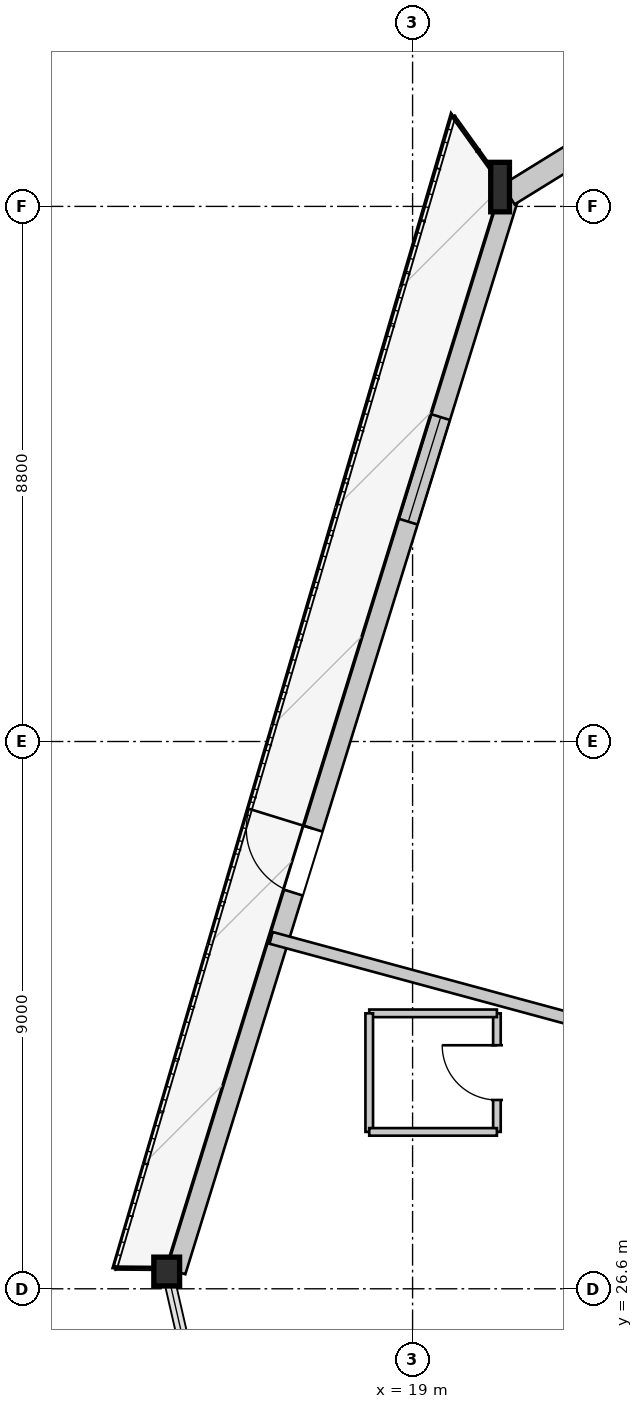
"""IFC4 building model, lengths in metres.
Left out: names, types, materials, properties, quantities, classifications, styles, units other than length and angle.
Written with IfcOpenShell. Run it as: python <this file> out.ifc"""

import sys

from ifc_helpers import new_model, si_unit, direction, frame, frame_2d, origin, origin_2d, place, context, subcontext, project, spatial, rectangle, i_section, extrude, source, transform, mapped, element, fill, save


model = new_model("IFC4")
c1 = context("Model", 3, precision=1e-05, world=origin(), true_north=direction((0.0, 1.0)))
c2 = subcontext(c1, "Body", "Model", "MODEL_VIEW")
j1 = project(units=[si_unit("LENGTHUNIT", "METRE"), si_unit("PLANEANGLEUNIT", "RADIAN")], contexts=[c1])
p1 = place(None, origin())
s1 = spatial("IfcSite", under=j1, at=p1, CompositionType="ELEMENT")
p2 = place(p1, origin())
s2 = spatial("IfcBuilding", under=s1, at=p2, CompositionType="ELEMENT")
p3 = place(p2, frame((0.0, 0.0, 32.85)))
s3 = spatial("IfcBuildingStorey", under=s2, at=p3, CompositionType="ELEMENT", Elevation=32.85)
m1 = source(origin(), c2, "Body", "SweptSolid", [
    extrude(i_section(OverallWidth=0.308, OverallDepth=0.814, WebThickness=0.021, FlangeThickness=0.04, at=origin_2d()), origin(), (0.0, 0.0, 1.0), 3.387),
])
p4 = place(p3, frame((20.479, 44.756, 0.0), z_axis=(-0.023283783401, -0.02263500925, 0.99947262183), x_axis=(0.69704669242, -0.717025737744, 0.0)))
e1 = element("IfcColumn", 1, at=p4, inside=s3, PredefinedType="COLUMN", context=c2, shape_type="MappedRepresentation", body=[
    mapped(m1, transform((0.0, 0.0, 0.0), x_axis=(1.0, 0.0, 0.0), y_axis=(0.0, 1.0, 0.0), z_axis=(0.0, 0.0, 1.0), scale=1.0)),
])
m2 = source(origin(), c2, "Body", "SweptSolid", [
    extrude(i_section(OverallWidth=0.424, OverallDepth=0.474, WebThickness=0.043, FlangeThickness=0.068, at=origin_2d()), origin(), (0.0, 0.0, 1.0), 3.386),
])
p5 = place(p3, frame((14.957, 26.934, 0.0), z_axis=(-0.000360461137, -0.029701997702, 0.999558733342), x_axis=(0.999926367828, -0.012135028736, 0.0)))
e2 = element("IfcColumn", 2, at=p5, inside=s3, PredefinedType="COLUMN", context=c2, shape_type="MappedRepresentation", body=[
    mapped(m2, transform((0.0, 0.0, 0.0), x_axis=(1.0, 0.0, 0.0), y_axis=(0.0, 1.0, 0.0), z_axis=(0.0, 0.0, 1.0), scale=1.0)),
])
p6 = place(p3, frame((15.11, 26.886, 0.0), z_axis=(0.0, 0.0, 1.0), x_axis=(0.295931636949, 0.955209121739, 0.0)))
e3 = element("IfcWall", 3, at=p6, inside=s3, PredefinedType="SOLIDWALL", context=c2, shape_type="SweptSolid", body=[
    extrude(rectangle(XDim=18.658, YDim=0.32, at=frame_2d((9.329, 0.0))), origin(), (0.0, 0.0, 1.0), 2.592),
])
p7 = place(p6, frame((6.521, 0.0, 0.0)))
e4 = element("IfcOpeningElement", 4, at=p7, cuts=e3, PredefinedType="OPENING", context=c2, shape_type="SweptSolid", body=[
    extrude(rectangle(XDim=1.1, YDim=2.3, at=frame_2d((0.55, 1.15))), frame((0.0, 0.17, 0.0), z_axis=(0.0, -1.0, 0.0), x_axis=(1.0, 0.0, 0.0)), (0.0, 0.0, 1.0), 0.34),
])
p8 = place(p6, frame((12.907, 0.0, 0.272)))
e5 = element("IfcOpeningElement", 5, at=p8, cuts=e3, PredefinedType="OPENING", context=c2, shape_type="SweptSolid", body=[
    extrude(rectangle(XDim=1.8, YDim=2.2, at=frame_2d((0.9, 1.1))), frame((0.0, 0.17, 0.0), z_axis=(0.0, -1.0, 0.0), x_axis=(1.0, 0.0, 0.0)), (0.0, 0.0, 1.0), 0.34),
])
p9 = place(p3, frame((20.578, 44.594, 0.0), z_axis=(0.0, 0.0, 1.0), x_axis=(0.850784925856, 0.525514043519, 0.0)))
e6 = element("IfcWall", 6, at=p9, inside=s3, PredefinedType="SOLIDWALL", context=c2, shape_type="SweptSolid", body=[
    extrude(rectangle(XDim=6.631, YDim=0.38, at=frame_2d((3.316, 0.0))), origin(), (0.0, 0.0, 1.0), 2.592),
])
p10 = place(p3, frame((27.3, 29.495, 0.0), z_axis=(0.0, 0.0, 1.0), x_axis=(-0.965288478022, 0.261186052841, 0.0)))
e7 = element("IfcWall", 7, at=p10, inside=s3, PredefinedType="PARTITIONING", context=c2, shape_type="SweptSolid", body=[
    extrude(rectangle(XDim=11.009, YDim=0.2, at=frame_2d((5.505, 0.0))), origin(), (0.0, 0.0, 1.0), 3.3),
])
p11 = place(p3, frame((20.387, 29.18, 0.0), z_axis=(0.0, 0.0, 1.0), x_axis=(0.0, 1.0, 0.0)))
e8 = element("IfcWall", 8, at=p11, inside=s3, PredefinedType="PARTITIONING", context=c2, shape_type="SweptSolid", body=[
    extrude(rectangle(XDim=1.95, YDim=0.125, at=frame_2d((0.975, 0.0))), origin(), (0.0, 0.0, 1.0), 3.3),
])
p12 = place(p11, frame((0.525, 0.0, 0.0)))
e9 = element("IfcOpeningElement", 9, at=p12, cuts=e8, PredefinedType="OPENING", context=c2, shape_type="SweptSolid", body=[
    extrude(rectangle(XDim=0.9, YDim=2.1, at=frame_2d((0.45, 1.05))), frame((0.0, 0.073, 0.0), z_axis=(0.0, -1.0, 0.0), x_axis=(1.0, 0.0, 0.0)), (0.0, 0.0, 1.0), 0.145),
])
p13 = place(p3, frame((20.387, 31.13, 0.0), z_axis=(0.0, 0.0, 1.0), x_axis=(-1.0, 0.0, 0.0)))
e10 = element("IfcWall", 10, at=p13, inside=s3, PredefinedType="PARTITIONING", context=c2, shape_type="SweptSolid", body=[
    extrude(rectangle(XDim=2.1, YDim=0.125, at=frame_2d((1.05, 0.0))), origin(), (0.0, 0.0, 1.0), 3.3),
])
p14 = place(p3, frame((18.287, 31.13, 0.0), z_axis=(0.0, 0.0, 1.0), x_axis=(0.0, -1.0, 0.0)))
e11 = element("IfcWall", 11, at=p14, inside=s3, PredefinedType="PARTITIONING", context=c2, shape_type="SweptSolid", body=[
    extrude(rectangle(XDim=1.95, YDim=0.125, at=frame_2d((0.975, 0.0))), origin(), (0.0, 0.0, 1.0), 3.3),
])
p15 = place(p3, frame((18.287, 29.18, 0.0), z_axis=(0.0, 0.0, 1.0), x_axis=(1.0, 0.0, 0.0)))
e12 = element("IfcWall", 12, at=p15, inside=s3, PredefinedType="PARTITIONING", context=c2, shape_type="SweptSolid", body=[
    extrude(rectangle(XDim=2.1, YDim=0.125, at=frame_2d((1.05, 0.0))), origin(), (0.0, 0.0, 1.0), 3.3),
])
m3 = source(origin(), c2, "Body", "SweptSolid", [
    extrude(rectangle(XDim=1.1, YDim=2.3, at=frame_2d((0.55, 1.15))), frame((0.0, 0.025, 0.0), z_axis=(0.0, -1.0, 0.0), x_axis=(1.0, 0.0, 0.0)), (0.0, 0.0, 1.0), 0.05),
])
p16 = place(p7, origin())
e13 = element("IfcDoor", 13, at=p16, inside=s3, OperationType="SINGLE_SWING_RIGHT", PredefinedType="DOOR", context=c2, shape_type="MappedRepresentation", body=[
    mapped(m3, transform((0.0, 0.0, 0.0), x_axis=(1.0, 0.0, 0.0), y_axis=(0.0, 1.0, 0.0), z_axis=(0.0, 0.0, 1.0), scale=1.0)),
])
fill(e4, e13)
m4 = source(origin(), c2, "Body", "SweptSolid", [
    extrude(rectangle(XDim=1.8, YDim=2.2, at=frame_2d((0.9, 1.1))), frame((0.0, 0.03, 0.0), z_axis=(0.0, -1.0, 0.0), x_axis=(1.0, 0.0, 0.0)), (0.0, 0.0, 1.0), 0.06),
])
p17 = place(p8, origin())
e14 = element("IfcWindow", 14, at=p17, inside=s3, PartitioningType="SINGLE_PANEL", PredefinedType="WINDOW", context=c2, shape_type="MappedRepresentation", body=[
    mapped(m4, transform((0.0, 0.0, 0.0), x_axis=(1.0, 0.0, 0.0), y_axis=(0.0, 1.0, 0.0), z_axis=(0.0, 0.0, 1.0), scale=1.0)),
])
fill(e5, e14)
m5 = source(origin(), c2, "Body", "SweptSolid", [
    extrude(rectangle(XDim=0.9, YDim=2.1, at=frame_2d((0.45, 1.05))), frame((0.0, 0.025, 0.0), z_axis=(0.0, -1.0, 0.0), x_axis=(1.0, 0.0, 0.0)), (0.0, 0.0, 1.0), 0.05),
])
p18 = place(p12, origin())
e15 = element("IfcDoor", 15, at=p18, inside=s3, OperationType="SINGLE_SWING_RIGHT", PredefinedType="DOOR", context=c2, shape_type="MappedRepresentation", body=[
    mapped(m5, transform((0.0, 0.0, 0.0), x_axis=(1.0, 0.0, 0.0), y_axis=(0.0, 1.0, 0.0), z_axis=(0.0, 0.0, 1.0), scale=1.0)),
])
fill(e9, e15)
save(model, sys.argv[1])
